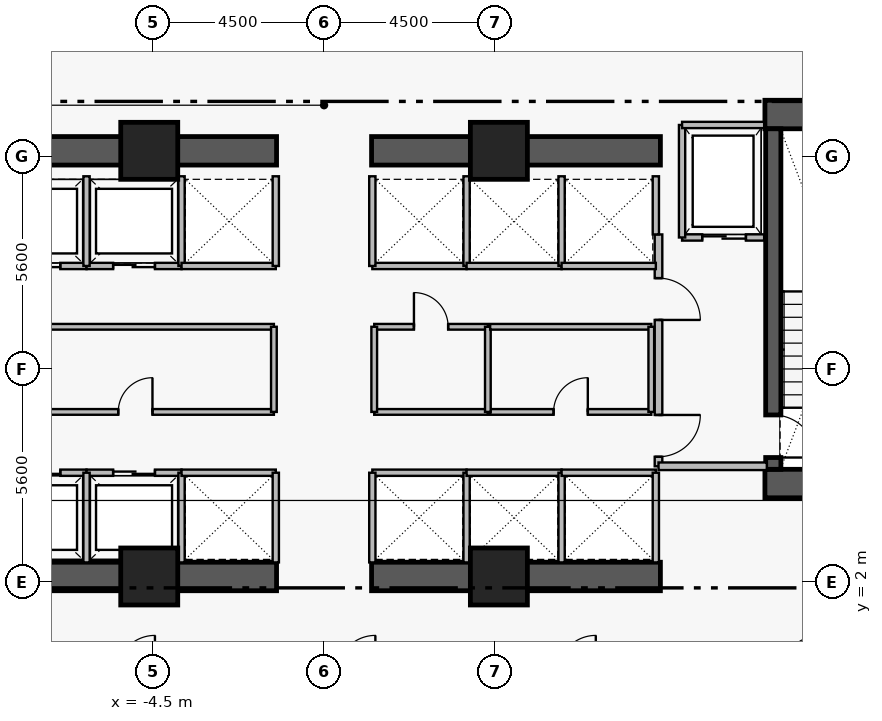
"""IFC4 building model, lengths in metres.
Left out: names, types, materials, properties, quantities, classifications, styles, units other than length and angle.
Written with IfcOpenShell. Run it as: python <this file> out.ifc"""

import sys

from ifc_helpers import new_model, si_unit, direction, frame, frame_2d, origin, origin_2d, place, context, subcontext, project, spatial, rectangle, extrude, element, fill, save


model = new_model("IFC4")
c1 = context("Model", 3, precision=1e-05, world=origin(), true_north=direction((0.0, 1.0)))
c2 = subcontext(c1, "Body", "Model", "MODEL_VIEW")
j1 = project(units=[si_unit("LENGTHUNIT", "METRE"), si_unit("PLANEANGLEUNIT", "RADIAN")], contexts=[c1])
p1 = place(None, origin())
s1 = spatial("IfcSite", under=j1, at=p1, CompositionType="ELEMENT")
p2 = place(p1, origin())
s2 = spatial("IfcBuilding", under=s1, at=p2, CompositionType="ELEMENT")
p3 = place(p2, frame((0.0, 0.0, 150.4)))
s3 = spatial("IfcBuildingStorey", under=s2, at=p3, CompositionType="ELEMENT", Elevation=150.4)
for number, where, z_axis, x_axis in (
    (1, (11.6, 14.305, 0.0), (0.0, 0.0, 1.0), (1.0, 0.0, 0.0)),
    (2, (11.6, 4.595, 0.0), (0.0, 0.0, 1.0), (1.0, 0.0, 0.0)),
):
    element("IfcWall", number, at=place(p3, frame(where, z_axis=z_axis, x_axis=x_axis)), inside=s3, PredefinedType="SHEAR", context=c2, shape_type="SweptSolid", body=[
        extrude(rectangle(XDim=4.56, YDim=0.75, at=frame_2d((2.28, 0.0))), origin(), (0.0, 0.0, 1.0), 3.46),
    ])
for number, where, z_axis, x_axis in (
    (3, (-8.85, 2.15, 0.0), (0.0, 0.0, 1.0), (1.0, 0.0, 0.0)),
    (4, (1.25, 2.15, 0.0), (0.0, 0.0, 1.0), (1.0, 0.0, 0.0)),
    (5, (-8.85, 13.35, 0.0), (0.0, 0.0, 1.0), (1.0, 0.0, 0.0)),
    (6, (1.25, 13.35, 0.0), (0.0, 0.0, 1.0), (1.0, 0.0, 0.0)),
):
    element("IfcWall", number, at=place(p3, frame(where, z_axis=z_axis, x_axis=x_axis)), inside=s3, PredefinedType="SHEAR", context=c2, shape_type="SweptSolid", body=[
        extrude(rectangle(XDim=7.6, YDim=0.75, at=frame_2d((3.8, 0.0))), origin(), (0.0, 0.0, 1.0), 3.43),
    ])
p4 = place(p3, frame((11.82, 13.93, 0.0), z_axis=(0.0, 0.0, 1.0), x_axis=(0.0, -1.0, 0.0)))
e7 = element("IfcWall", 7, at=p4, inside=s3, PredefinedType="SHEAR", context=c2, shape_type="SweptSolid", body=[
    extrude(rectangle(XDim=8.96, YDim=0.4, at=frame_2d((4.48, 0.0))), origin(), (0.0, 0.0, 1.0), 3.46),
])
p5 = place(p4, frame((7.53, 0.0, 0.0)))
e8 = element("IfcOpeningElement", 8, at=p5, cuts=e7, PredefinedType="OPENING", context=c2, shape_type="SweptSolid", body=[
    extrude(rectangle(XDim=1.12, YDim=2.22, at=frame_2d((0.56, 1.11))), frame((0.0, 0.21, 0.0), z_axis=(0.0, -1.0, 0.0), x_axis=(1.0, 0.0, 0.0)), (0.0, 0.0, 1.0), 0.42),
])
for number, where, z_axis, x_axis in (
    (9, (-4.6, 13.35, 0.0), (0.0, 0.0, 1.0), (1.0, 0.0, 0.0)),
    (10, (4.6, 13.35, 0.0), (0.0, 0.0, 1.0), (1.0, 0.0, 0.0)),
    (11, (-4.6, 2.15, 0.0), (0.0, 0.0, 1.0), (1.0, 0.0, 0.0)),
    (12, (4.6, 2.15, 0.0), (0.0, 0.0, 1.0), (1.0, 0.0, 0.0)),
):
    element("IfcColumn", number, at=place(p3, frame(where, z_axis=z_axis, x_axis=x_axis)), inside=s3, PredefinedType="COLUMN", context=c2, shape_type="SweptSolid", body=[
        extrude(rectangle(XDim=1.5, YDim=1.5, at=origin_2d()), origin(), (0.0, 0.0, 1.0), 3.65),
    ])
p6 = place(p3, frame((8.8, 11.15, 0.0), z_axis=(0.0, 0.0, 1.0), x_axis=(0.0, -1.0, 0.0)))
e13 = element("IfcWall", 13, at=p6, inside=s3, PredefinedType="PARTITIONING", context=c2, shape_type="SweptSolid", body=[
    extrude(rectangle(XDim=6.1, YDim=0.2, at=frame_2d((3.05, 0.0))), origin(), (0.0, 0.0, 1.0), 3.43),
])
p7 = place(p6, frame((1.15, 0.0, 0.0)))
e14 = element("IfcOpeningElement", 14, at=p7, cuts=e13, PredefinedType="OPENING", context=c2, shape_type="SweptSolid", body=[
    extrude(rectangle(XDim=1.1, YDim=2.2, at=frame_2d((0.55, 1.1))), frame((0.0, 0.11, 0.0), z_axis=(0.0, -1.0, 0.0), x_axis=(1.0, 0.0, 0.0)), (0.0, 0.0, 1.0), 0.22),
])
p8 = place(p6, frame((4.75, 0.0, 0.0)))
e15 = element("IfcOpeningElement", 15, at=p8, cuts=e13, PredefinedType="OPENING", context=c2, shape_type="SweptSolid", body=[
    extrude(rectangle(XDim=1.1, YDim=2.2, at=frame_2d((0.55, 1.1))), frame((0.0, 0.11, 0.0), z_axis=(0.0, -1.0, 0.0), x_axis=(1.0, 0.0, 0.0)), (0.0, 0.0, 1.0), 0.22),
])
p9 = place(p3, frame((9.42, 11.07, 0.0), z_axis=(0.0, 0.0, 1.0), x_axis=(1.0, 0.0, 0.0)))
e16 = element("IfcWall", 16, at=p9, inside=s3, PredefinedType="PARTITIONING", context=c2, shape_type="SweptSolid", body=[
    extrude(rectangle(XDim=2.16, YDim=0.165, at=frame_2d((1.08, 0.0))), origin(), (0.0, 0.0, 1.0), 3.43),
])
p10 = place(p9, frame((0.53, 0.0, 0.0)))
e17 = element("IfcOpeningElement", 17, at=p10, cuts=e16, PredefinedType="OPENING", context=c2, shape_type="SweptSolid", body=[
    extrude(rectangle(XDim=1.15, YDim=2.25, at=frame_2d((0.575, 1.125))), frame((0.0, 0.093, 0.0), z_axis=(0.0, -1.0, 0.0), x_axis=(1.0, 0.0, 0.0)), (0.0, 0.0, 1.0), 0.185),
])
p11 = place(p3, frame((-8.73, 4.88, 0.0), z_axis=(0.0, 0.0, 1.0), x_axis=(1.0, 0.0, 0.0)))
e18 = element("IfcWall", 18, at=p11, inside=s3, PredefinedType="PARTITIONING", context=c2, shape_type="SweptSolid", body=[
    extrude(rectangle(XDim=2.48, YDim=0.165, at=frame_2d((1.24, 0.0))), origin(), (0.0, 0.0, 1.0), 3.43),
])
p12 = place(p11, frame((0.69, 0.0, 0.0)))
e19 = element("IfcOpeningElement", 19, at=p12, cuts=e18, PredefinedType="OPENING", context=c2, shape_type="SweptSolid", body=[
    extrude(rectangle(XDim=1.1, YDim=2.25, at=frame_2d((0.55, 1.125))), frame((0.0, 0.093, 0.0), z_axis=(0.0, -1.0, 0.0), x_axis=(1.0, 0.0, 0.0)), (0.0, 0.0, 1.0), 0.185),
])
p13 = place(p3, frame((-6.25, 4.88, 0.0), z_axis=(0.0, 0.0, 1.0), x_axis=(1.0, 0.0, 0.0)))
e20 = element("IfcWall", 20, at=p13, inside=s3, PredefinedType="PARTITIONING", context=c2, shape_type="SweptSolid", body=[
    extrude(rectangle(XDim=2.5, YDim=0.165, at=frame_2d((1.25, 0.0))), origin(), (0.0, 0.0, 1.0), 3.43),
])
p14 = place(p13, frame((0.7, 0.0, 0.0)))
e21 = element("IfcOpeningElement", 21, at=p14, cuts=e20, PredefinedType="OPENING", context=c2, shape_type="SweptSolid", body=[
    extrude(rectangle(XDim=1.1, YDim=2.25, at=frame_2d((0.55, 1.125))), frame((0.0, 0.093, 0.0), z_axis=(0.0, -1.0, 0.0), x_axis=(1.0, 0.0, 0.0)), (0.0, 0.0, 1.0), 0.185),
])
p15 = place(p3, frame((-8.73, 10.32, 0.0), z_axis=(0.0, 0.0, 1.0), x_axis=(1.0, 0.0, 0.0)))
e22 = element("IfcWall", 22, at=p15, inside=s3, PredefinedType="PARTITIONING", context=c2, shape_type="SweptSolid", body=[
    extrude(rectangle(XDim=2.48, YDim=0.165, at=frame_2d((1.24, 0.0))), origin(), (0.0, 0.0, 1.0), 3.43),
])
p16 = place(p15, frame((0.69, 0.0, 0.0)))
e23 = element("IfcOpeningElement", 23, at=p16, cuts=e22, PredefinedType="OPENING", context=c2, shape_type="SweptSolid", body=[
    extrude(rectangle(XDim=1.1, YDim=2.25, at=frame_2d((0.55, 1.125))), frame((0.0, 0.093, 0.0), z_axis=(0.0, -1.0, 0.0), x_axis=(1.0, 0.0, 0.0)), (0.0, 0.0, 1.0), 0.185),
])
p17 = place(p3, frame((-6.25, 10.32, 0.0), z_axis=(0.0, 0.0, 1.0), x_axis=(1.0, 0.0, 0.0)))
e24 = element("IfcWall", 24, at=p17, inside=s3, PredefinedType="PARTITIONING", context=c2, shape_type="SweptSolid", body=[
    extrude(rectangle(XDim=2.5, YDim=0.165, at=frame_2d((1.25, 0.0))), origin(), (0.0, 0.0, 1.0), 3.43),
])
p18 = place(p17, frame((0.7, 0.0, 0.0)))
e25 = element("IfcOpeningElement", 25, at=p18, cuts=e24, PredefinedType="OPENING", context=c2, shape_type="SweptSolid", body=[
    extrude(rectangle(XDim=1.1, YDim=2.25, at=frame_2d((0.55, 1.125))), frame((0.0, 0.093, 0.0), z_axis=(0.0, -1.0, 0.0), x_axis=(1.0, 0.0, 0.0)), (0.0, 0.0, 1.0), 0.185),
])
p19 = place(p3, frame((-8.61, 6.48, 0.0), z_axis=(0.0, 0.0, 1.0), x_axis=(1.0, 0.0, 0.0)))
e26 = element("IfcWall", 26, at=p19, inside=s3, PredefinedType="PARTITIONING", context=c2, shape_type="SweptSolid", body=[
    extrude(rectangle(XDim=7.29, YDim=0.15, at=frame_2d((3.645, 0.0))), origin(), (0.0, 0.0, 1.0), 3.43),
])
p20 = place(p19, frame((3.195, 0.0, 0.0)))
e27 = element("IfcOpeningElement", 27, at=p20, cuts=e26, PredefinedType="OPENING", context=c2, shape_type="SweptSolid", body=[
    extrude(rectangle(XDim=0.9, YDim=2.15, at=frame_2d((0.45, 1.075))), frame((0.0, 0.085, 0.0), z_axis=(0.0, -1.0, 0.0), x_axis=(1.0, 0.0, 0.0)), (0.0, 0.0, 1.0), 0.17),
])
p21 = place(p3, frame((1.32, 8.72, 0.0), z_axis=(0.0, 0.0, 1.0), x_axis=(1.0, 0.0, 0.0)))
e28 = element("IfcWall", 28, at=p21, inside=s3, PredefinedType="PARTITIONING", context=c2, shape_type="SweptSolid", body=[
    extrude(rectangle(XDim=2.99, YDim=0.15, at=frame_2d((1.495, 0.0))), origin(), (0.0, 0.0, 1.0), 3.43),
])
p22 = place(p21, frame((1.045, 0.0, 0.0)))
e29 = element("IfcOpeningElement", 29, at=p22, cuts=e28, PredefinedType="OPENING", context=c2, shape_type="SweptSolid", body=[
    extrude(rectangle(XDim=0.9, YDim=2.15, at=frame_2d((0.45, 1.075))), frame((0.0, 0.085, 0.0), z_axis=(0.0, -1.0, 0.0), x_axis=(1.0, 0.0, 0.0)), (0.0, 0.0, 1.0), 0.17),
])
p23 = place(p3, frame((4.37, 6.48, 0.0), z_axis=(0.0, 0.0, 1.0), x_axis=(1.0, 0.0, 0.0)))
e30 = element("IfcWall", 30, at=p23, inside=s3, PredefinedType="PARTITIONING", context=c2, shape_type="SweptSolid", body=[
    extrude(rectangle(XDim=4.24, YDim=0.15, at=frame_2d((2.12, 0.0))), origin(), (0.0, 0.0, 1.0), 3.43),
])
p24 = place(p23, frame((1.67, 0.0, 0.0)))
e31 = element("IfcOpeningElement", 31, at=p24, cuts=e30, PredefinedType="OPENING", context=c2, shape_type="SweptSolid", body=[
    extrude(rectangle(XDim=0.9, YDim=2.15, at=frame_2d((0.45, 1.075))), frame((0.0, 0.085, 0.0), z_axis=(0.0, -1.0, 0.0), x_axis=(1.0, 0.0, 0.0)), (0.0, 0.0, 1.0), 0.17),
])
p25 = place(p3, frame((8.8, 5.05, 0.0), z_axis=(0.0, 0.0, 1.0), x_axis=(1.0, 0.0, 0.0)))
e32 = element("IfcWall", 32, at=p25, inside=s3, PredefinedType="PARTITIONING", context=c2, shape_type="SweptSolid", body=[
    extrude(rectangle(XDim=2.85, YDim=0.2, at=frame_2d((1.425, 0.0))), origin(), (0.0, 0.0, 1.0), 3.43),
])
p26 = place(p3, frame((9.42, 11.07, 0.0), z_axis=(0.0, 0.0, 1.0), x_axis=(0.0, 1.0, 0.0)))
e33 = element("IfcWall", 33, at=p26, inside=s3, PredefinedType="PARTITIONING", context=c2, shape_type="SweptSolid", body=[
    extrude(rectangle(XDim=2.96, YDim=0.165, at=frame_2d((1.48, 0.0))), origin(), (0.0, 0.0, 1.0), 3.43),
])
p27 = place(p3, frame((9.42, 14.03, 0.0), z_axis=(0.0, 0.0, 1.0), x_axis=(1.0, 0.0, 0.0)))
e34 = element("IfcWall", 34, at=p27, inside=s3, PredefinedType="PARTITIONING", context=c2, shape_type="SweptSolid", body=[
    extrude(rectangle(XDim=2.16, YDim=0.165, at=frame_2d((1.08, 0.0))), origin(), (0.0, 0.0, 1.0), 3.43),
])
for number, where, z_axis, x_axis in (
    (35, (-6.25, 2.52, 0.0), (0.0, 0.0, 1.0), (0.0, 1.0, 0.0)),
    (36, (-3.75, 2.52, 0.0), (0.0, 0.0, 1.0), (0.0, 1.0, 0.0)),
    (37, (-6.25, 10.32, 0.0), (0.0, 0.0, 1.0), (0.0, 1.0, 0.0)),
    (38, (-3.75, 10.32, 0.0), (0.0, 0.0, 1.0), (0.0, 1.0, 0.0)),
):
    element("IfcWall", number, at=place(p3, frame(where, z_axis=z_axis, x_axis=x_axis)), inside=s3, PredefinedType="PARTITIONING", context=c2, shape_type="SweptSolid", body=[
        extrude(rectangle(XDim=2.36, YDim=0.165, at=frame_2d((1.18, 0.0))), origin(), (0.0, 0.0, 1.0), 3.43),
    ])
p28 = place(p3, frame((-3.75, 4.88, 0.0), z_axis=(0.0, 0.0, 1.0), x_axis=(1.0, 0.0, 0.0)))
e39 = element("IfcWall", 39, at=p28, inside=s3, PredefinedType="PARTITIONING", context=c2, shape_type="SweptSolid", body=[
    extrude(rectangle(XDim=2.48, YDim=0.165, at=frame_2d((1.24, 0.0))), origin(), (0.0, 0.0, 1.0), 3.43),
])
p29 = place(p3, frame((-1.27, 2.52, 0.0), z_axis=(0.0, 0.0, 1.0), x_axis=(0.0, 1.0, 0.0)))
e40 = element("IfcWall", 40, at=p29, inside=s3, PredefinedType="PARTITIONING", context=c2, shape_type="SweptSolid", body=[
    extrude(rectangle(XDim=2.36, YDim=0.165, at=frame_2d((1.18, 0.0))), origin(), (0.0, 0.0, 1.0), 3.43),
])
p30 = place(p3, frame((1.27, 4.88, 0.0), z_axis=(0.0, 0.0, 1.0), x_axis=(1.0, 0.0, 0.0)))
e41 = element("IfcWall", 41, at=p30, inside=s3, PredefinedType="PARTITIONING", context=c2, shape_type="SweptSolid", body=[
    extrude(rectangle(XDim=2.48, YDim=0.165, at=frame_2d((1.24, 0.0))), origin(), (0.0, 0.0, 1.0), 3.43),
])
for number, where, z_axis, x_axis in (
    (42, (1.27, 2.52, 0.0), (0.0, 0.0, 1.0), (0.0, 1.0, 0.0)),
    (43, (3.75, 2.52, 0.0), (0.0, 0.0, 1.0), (0.0, 1.0, 0.0)),
):
    element("IfcWall", number, at=place(p3, frame(where, z_axis=z_axis, x_axis=x_axis)), inside=s3, PredefinedType="PARTITIONING", context=c2, shape_type="SweptSolid", body=[
        extrude(rectangle(XDim=2.36, YDim=0.165, at=frame_2d((1.18, 0.0))), origin(), (0.0, 0.0, 1.0), 3.43),
    ])
p31 = place(p3, frame((-3.75, 10.32, 0.0), z_axis=(0.0, 0.0, 1.0), x_axis=(1.0, 0.0, 0.0)))
e44 = element("IfcWall", 44, at=p31, inside=s3, PredefinedType="PARTITIONING", context=c2, shape_type="SweptSolid", body=[
    extrude(rectangle(XDim=2.48, YDim=0.165, at=frame_2d((1.24, 0.0))), origin(), (0.0, 0.0, 1.0), 3.43),
])
p32 = place(p3, frame((-1.27, 10.32, 0.0), z_axis=(0.0, 0.0, 1.0), x_axis=(0.0, 1.0, 0.0)))
e45 = element("IfcWall", 45, at=p32, inside=s3, PredefinedType="PARTITIONING", context=c2, shape_type="SweptSolid", body=[
    extrude(rectangle(XDim=2.36, YDim=0.165, at=frame_2d((1.18, 0.0))), origin(), (0.0, 0.0, 1.0), 3.43),
])
p33 = place(p3, frame((1.27, 10.32, 0.0), z_axis=(0.0, 0.0, 1.0), x_axis=(1.0, 0.0, 0.0)))
e46 = element("IfcWall", 46, at=p33, inside=s3, PredefinedType="PARTITIONING", context=c2, shape_type="SweptSolid", body=[
    extrude(rectangle(XDim=2.48, YDim=0.165, at=frame_2d((1.24, 0.0))), origin(), (0.0, 0.0, 1.0), 3.43),
])
for number, where, z_axis, x_axis in (
    (47, (1.27, 10.32, 0.0), (0.0, 0.0, 1.0), (0.0, 1.0, 0.0)),
    (48, (3.75, 10.32, 0.0), (0.0, 0.0, 1.0), (0.0, 1.0, 0.0)),
):
    element("IfcWall", number, at=place(p3, frame(where, z_axis=z_axis, x_axis=x_axis)), inside=s3, PredefinedType="PARTITIONING", context=c2, shape_type="SweptSolid", body=[
        extrude(rectangle(XDim=2.36, YDim=0.165, at=frame_2d((1.18, 0.0))), origin(), (0.0, 0.0, 1.0), 3.43),
    ])
p34 = place(p3, frame((3.75, 4.88, 0.0), z_axis=(0.0, 0.0, 1.0), x_axis=(1.0, 0.0, 0.0)))
e49 = element("IfcWall", 49, at=p34, inside=s3, PredefinedType="PARTITIONING", context=c2, shape_type="SweptSolid", body=[
    extrude(rectangle(XDim=2.5, YDim=0.165, at=frame_2d((1.25, 0.0))), origin(), (0.0, 0.0, 1.0), 3.43),
])
p35 = place(p3, frame((6.25, 2.52, 0.0), z_axis=(0.0, 0.0, 1.0), x_axis=(0.0, 1.0, 0.0)))
e50 = element("IfcWall", 50, at=p35, inside=s3, PredefinedType="PARTITIONING", context=c2, shape_type="SweptSolid", body=[
    extrude(rectangle(XDim=2.36, YDim=0.165, at=frame_2d((1.18, 0.0))), origin(), (0.0, 0.0, 1.0), 3.43),
])
p36 = place(p3, frame((6.25, 4.88, 0.0), z_axis=(0.0, 0.0, 1.0), x_axis=(1.0, 0.0, 0.0)))
e51 = element("IfcWall", 51, at=p36, inside=s3, PredefinedType="PARTITIONING", context=c2, shape_type="SweptSolid", body=[
    extrude(rectangle(XDim=2.48, YDim=0.165, at=frame_2d((1.24, 0.0))), origin(), (0.0, 0.0, 1.0), 3.43),
])
p37 = place(p3, frame((8.73, 2.52, 0.0), z_axis=(0.0, 0.0, 1.0), x_axis=(0.0, 1.0, 0.0)))
e52 = element("IfcWall", 52, at=p37, inside=s3, PredefinedType="PARTITIONING", context=c2, shape_type="SweptSolid", body=[
    extrude(rectangle(XDim=2.36, YDim=0.165, at=frame_2d((1.18, 0.0))), origin(), (0.0, 0.0, 1.0), 3.43),
])
p38 = place(p3, frame((3.75, 10.32, 0.0), z_axis=(0.0, 0.0, 1.0), x_axis=(1.0, 0.0, 0.0)))
e53 = element("IfcWall", 53, at=p38, inside=s3, PredefinedType="PARTITIONING", context=c2, shape_type="SweptSolid", body=[
    extrude(rectangle(XDim=2.5, YDim=0.165, at=frame_2d((1.25, 0.0))), origin(), (0.0, 0.0, 1.0), 3.43),
])
p39 = place(p3, frame((6.25, 10.32, 0.0), z_axis=(0.0, 0.0, 1.0), x_axis=(0.0, 1.0, 0.0)))
e54 = element("IfcWall", 54, at=p39, inside=s3, PredefinedType="PARTITIONING", context=c2, shape_type="SweptSolid", body=[
    extrude(rectangle(XDim=2.36, YDim=0.165, at=frame_2d((1.18, 0.0))), origin(), (0.0, 0.0, 1.0), 3.43),
])
p40 = place(p3, frame((6.25, 10.32, 0.0), z_axis=(0.0, 0.0, 1.0), x_axis=(1.0, 0.0, 0.0)))
e55 = element("IfcWall", 55, at=p40, inside=s3, PredefinedType="PARTITIONING", context=c2, shape_type="SweptSolid", body=[
    extrude(rectangle(XDim=2.48, YDim=0.165, at=frame_2d((1.24, 0.0))), origin(), (0.0, 0.0, 1.0), 3.43),
])
p41 = place(p3, frame((8.73, 11.15, 0.0), z_axis=(0.0, 0.0, 1.0), x_axis=(0.0, 1.0, 0.0)))
e56 = element("IfcWall", 56, at=p41, inside=s3, PredefinedType="PARTITIONING", context=c2, shape_type="SweptSolid", body=[
    extrude(rectangle(XDim=1.53, YDim=0.165, at=frame_2d((0.765, 0.0))), origin(), (0.0, 0.0, 1.0), 3.43),
])
p42 = place(p3, frame((-8.61, 8.72, 0.0), z_axis=(0.0, 0.0, 1.0), x_axis=(1.0, 0.0, 0.0)))
e57 = element("IfcWall", 57, at=p42, inside=s3, PredefinedType="PARTITIONING", context=c2, shape_type="SweptSolid", body=[
    extrude(rectangle(XDim=7.29, YDim=0.15, at=frame_2d((3.645, 0.0))), origin(), (0.0, 0.0, 1.0), 3.43),
])
p43 = place(p3, frame((-1.32, 6.48, 0.0), z_axis=(0.0, 0.0, 1.0), x_axis=(0.0, 1.0, 0.0)))
e58 = element("IfcWall", 58, at=p43, inside=s3, PredefinedType="PARTITIONING", context=c2, shape_type="SweptSolid", body=[
    extrude(rectangle(XDim=2.24, YDim=0.15, at=frame_2d((1.12, 0.0))), origin(), (0.0, 0.0, 1.0), 3.43),
])
p44 = place(p3, frame((1.32, 6.48, 0.0), z_axis=(0.0, 0.0, 1.0), x_axis=(1.0, 0.0, 0.0)))
e59 = element("IfcWall", 59, at=p44, inside=s3, PredefinedType="PARTITIONING", context=c2, shape_type="SweptSolid", body=[
    extrude(rectangle(XDim=2.99, YDim=0.15, at=frame_2d((1.495, 0.0))), origin(), (0.0, 0.0, 1.0), 3.43),
])
for number, where, z_axis, x_axis in (
    (60, (1.32, 6.48, 0.0), (0.0, 0.0, 1.0), (0.0, 1.0, 0.0)),
    (61, (4.31, 6.48, 0.0), (0.0, 0.0, 1.0), (0.0, 1.0, 0.0)),
):
    element("IfcWall", number, at=place(p3, frame(where, z_axis=z_axis, x_axis=x_axis)), inside=s3, PredefinedType="PARTITIONING", context=c2, shape_type="SweptSolid", body=[
        extrude(rectangle(XDim=2.24, YDim=0.15, at=frame_2d((1.12, 0.0))), origin(), (0.0, 0.0, 1.0), 3.43),
    ])
p45 = place(p3, frame((4.37, 8.72, 0.0), z_axis=(0.0, 0.0, 1.0), x_axis=(1.0, 0.0, 0.0)))
e62 = element("IfcWall", 62, at=p45, inside=s3, PredefinedType="PARTITIONING", context=c2, shape_type="SweptSolid", body=[
    extrude(rectangle(XDim=4.24, YDim=0.15, at=frame_2d((2.12, 0.0))), origin(), (0.0, 0.0, 1.0), 3.43),
])
p46 = place(p3, frame((8.61, 6.48, 0.0), z_axis=(0.0, 0.0, 1.0), x_axis=(0.0, 1.0, 0.0)))
e63 = element("IfcWall", 63, at=p46, inside=s3, PredefinedType="PARTITIONING", context=c2, shape_type="SweptSolid", body=[
    extrude(rectangle(XDim=2.24, YDim=0.15, at=frame_2d((1.12, 0.0))), origin(), (0.0, 0.0, 1.0), 3.43),
])
p47 = place(p5, origin())
e64 = element("IfcDoor", 64, at=p47, inside=s3, OperationType="SINGLE_SWING_RIGHT", PredefinedType="DOOR", context=c2, shape_type="SweptSolid", body=[
    extrude(rectangle(XDim=1.12, YDim=2.22, at=frame_2d((0.56, 1.11))), frame((0.0, 0.025, 0.0), z_axis=(0.0, -1.0, 0.0), x_axis=(1.0, 0.0, 0.0)), (0.0, 0.0, 1.0), 0.05),
])
fill(e8, e64)
p48 = place(p7, origin())
e65 = element("IfcDoor", 65, at=p48, inside=s3, OperationType="SINGLE_SWING_RIGHT", PredefinedType="DOOR", context=c2, shape_type="SweptSolid", body=[
    extrude(rectangle(XDim=1.1, YDim=2.2, at=frame_2d((0.55, 1.1))), frame((0.0, 0.025, 0.0), z_axis=(0.0, -1.0, 0.0), x_axis=(1.0, 0.0, 0.0)), (0.0, 0.0, 1.0), 0.05),
])
fill(e14, e65)
p49 = place(p8, origin())
e66 = element("IfcDoor", 66, at=p49, inside=s3, OperationType="SINGLE_SWING_LEFT", PredefinedType="DOOR", context=c2, shape_type="SweptSolid", body=[
    extrude(rectangle(XDim=1.1, YDim=2.2, at=frame_2d((0.55, 1.1))), frame((0.0, 0.025, 0.0), z_axis=(0.0, -1.0, 0.0), x_axis=(1.0, 0.0, 0.0)), (0.0, 0.0, 1.0), 0.05),
])
fill(e15, e66)
p50 = place(p10, origin())
e67 = element("IfcDoor", 67, at=p50, inside=s3, OperationType="SLIDING_TO_LEFT", PredefinedType="DOOR", context=c2, shape_type="SweptSolid", body=[
    extrude(rectangle(XDim=1.15, YDim=2.25, at=frame_2d((0.575, 1.125))), frame((0.0, 0.025, 0.0), z_axis=(0.0, -1.0, 0.0), x_axis=(1.0, 0.0, 0.0)), (0.0, 0.0, 1.0), 0.05),
])
fill(e17, e67)
p51 = place(p12, origin())
e68 = element("IfcDoor", 68, at=p51, inside=s3, OperationType="SLIDING_TO_LEFT", PredefinedType="DOOR", context=c2, shape_type="SweptSolid", body=[
    extrude(rectangle(XDim=1.1, YDim=2.25, at=frame_2d((0.55, 1.125))), frame((0.0, 0.025, 0.0), z_axis=(0.0, -1.0, 0.0), x_axis=(1.0, 0.0, 0.0)), (0.0, 0.0, 1.0), 0.05),
])
fill(e19, e68)
p52 = place(p14, origin())
e69 = element("IfcDoor", 69, at=p52, inside=s3, OperationType="SLIDING_TO_LEFT", PredefinedType="DOOR", context=c2, shape_type="SweptSolid", body=[
    extrude(rectangle(XDim=1.1, YDim=2.25, at=frame_2d((0.55, 1.125))), frame((0.0, 0.025, 0.0), z_axis=(0.0, -1.0, 0.0), x_axis=(1.0, 0.0, 0.0)), (0.0, 0.0, 1.0), 0.05),
])
fill(e21, e69)
p53 = place(p16, origin())
e70 = element("IfcDoor", 70, at=p53, inside=s3, OperationType="SLIDING_TO_LEFT", PredefinedType="DOOR", context=c2, shape_type="SweptSolid", body=[
    extrude(rectangle(XDim=1.1, YDim=2.25, at=frame_2d((0.55, 1.125))), frame((0.0, 0.025, 0.0), z_axis=(0.0, -1.0, 0.0), x_axis=(1.0, 0.0, 0.0)), (0.0, 0.0, 1.0), 0.05),
])
fill(e23, e70)
p54 = place(p18, origin())
e71 = element("IfcDoor", 71, at=p54, inside=s3, OperationType="SLIDING_TO_LEFT", PredefinedType="DOOR", context=c2, shape_type="SweptSolid", body=[
    extrude(rectangle(XDim=1.1, YDim=2.25, at=frame_2d((0.55, 1.125))), frame((0.0, 0.025, 0.0), z_axis=(0.0, -1.0, 0.0), x_axis=(1.0, 0.0, 0.0)), (0.0, 0.0, 1.0), 0.05),
])
fill(e25, e71)
p55 = place(p20, origin())
e72 = element("IfcDoor", 72, at=p55, inside=s3, OperationType="SINGLE_SWING_RIGHT", PredefinedType="DOOR", context=c2, shape_type="SweptSolid", body=[
    extrude(rectangle(XDim=0.9, YDim=2.15, at=frame_2d((0.45, 1.075))), frame((0.0, 0.025, 0.0), z_axis=(0.0, -1.0, 0.0), x_axis=(1.0, 0.0, 0.0)), (0.0, 0.0, 1.0), 0.05),
])
fill(e27, e72)
p56 = place(p22, origin())
e73 = element("IfcDoor", 73, at=p56, inside=s3, OperationType="SINGLE_SWING_LEFT", PredefinedType="DOOR", context=c2, shape_type="SweptSolid", body=[
    extrude(rectangle(XDim=0.9, YDim=2.15, at=frame_2d((0.45, 1.075))), frame((0.0, 0.025, 0.0), z_axis=(0.0, -1.0, 0.0), x_axis=(1.0, 0.0, 0.0)), (0.0, 0.0, 1.0), 0.05),
])
fill(e29, e73)
p57 = place(p24, origin())
e74 = element("IfcDoor", 74, at=p57, inside=s3, OperationType="SINGLE_SWING_RIGHT", PredefinedType="DOOR", context=c2, shape_type="SweptSolid", body=[
    extrude(rectangle(XDim=0.9, YDim=2.15, at=frame_2d((0.45, 1.075))), frame((0.0, 0.025, 0.0), z_axis=(0.0, -1.0, 0.0), x_axis=(1.0, 0.0, 0.0)), (0.0, 0.0, 1.0), 0.05),
])
fill(e31, e74)
save(model, sys.argv[1])
